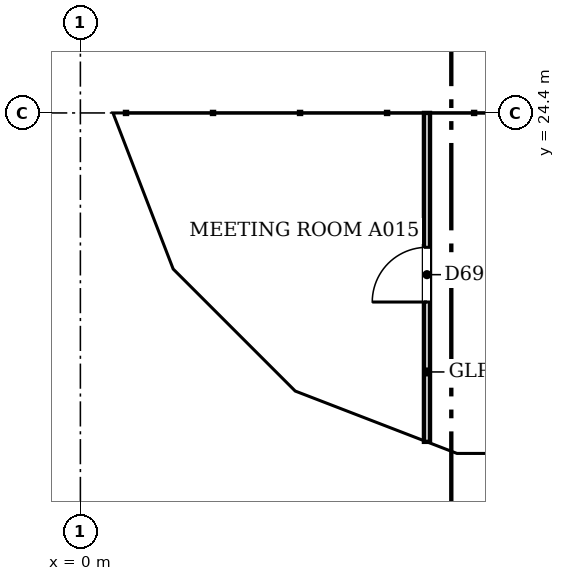
"""IFC4 building model, lengths in metres.
Left out: names, types, materials, properties, quantities, classifications, styles, units other than length and angle.
Written with IfcOpenShell. Run it as: python <this file> out.ifc"""

import sys

from ifc_helpers import new_model, si_unit, direction, frame, frame_2d, origin, place, context, subcontext, project, spatial, polyline, rectangle, outline, extrude, faceted_brep, source, transform, mapped, element, fill, save


model = new_model("IFC4")
c1 = context("Model", 3, precision=1e-05, world=origin(), true_north=direction((0.0, 1.0)))
c2 = subcontext(c1, "Body", "Model", "MODEL_VIEW")
j1 = project(units=[si_unit("LENGTHUNIT", "METRE"), si_unit("PLANEANGLEUNIT", "RADIAN")], contexts=[c1])
p1 = place(None, origin())
s1 = spatial("IfcSite", under=j1, at=p1, CompositionType="ELEMENT")
p2 = place(p1, origin())
s2 = spatial("IfcBuilding", under=s1, at=p2, CompositionType="ELEMENT")
p3 = place(p2, frame((0.0, 0.0, 155.4)))
s3 = spatial("IfcBuildingStorey", under=s2, at=p3, CompositionType="ELEMENT", Elevation=155.4)
m1 = source(origin(), c2, "Body", "Brep", [
    faceted_brep([(6.053, -0.25, 0.0), (3.05, -0.25, 3.8), (0.0, -0.25, 0.0), (0.0, 0.25, 0.0), (3.05, 0.25, 3.8), (6.007, 0.25, 0.059), (6.007, 0.25, 0.0), (6.053, 0.0, 0.0)], [[[0, 1, 2]], [[3, 4, 5, 6]], [[5, 4, 1, 0, 7]], [[4, 3, 2, 1]], [[3, 6, 7, 0, 2]], [[7, 6, 5]]]),
])
p4 = place(p3, frame((0.25, 30.5, 0.0), z_axis=(0.0, 0.0, 1.0), x_axis=(0.0, -1.0, 0.0)))
e1 = element("IfcWall", 1, at=p4, inside=s3, PredefinedType="SOLIDWALL", context=c2, shape_type="MappedRepresentation", body=[
    mapped(m1, transform((0.0, 0.0, 0.0), scale=1.0)),
])
m2 = source(origin(), c2, "Body", "SweptSolid", [
    extrude(outline(polyline([(5.537, 0.25), (3.049, 3.399), (0.521, 0.25), (5.537, 0.25)])), frame((0.0, 0.26, 0.0), z_axis=(0.0, -1.0, 0.0), x_axis=(1.0, 0.0, 0.0)), (0.0, 0.0, 1.0), 0.52),
])
p5 = place(p4, origin())
e2 = element("IfcOpeningElement", 2, at=p5, cuts=e1, PredefinedType="OPENING", context=c2, shape_type="MappedRepresentation", body=[
    mapped(m2, transform((0.0, 0.0, 0.0), scale=1.0)),
])
m3 = source(origin(), c2, "Body", "Brep", [
    faceted_brep([(3.003, -0.25, 3.732), (2.95, -0.25, 3.8), (0.0, -0.25, 0.0), (3.003, -0.25, 0.0), (0.047, 0.25, 0.06), (2.898, 0.25, 3.732), (2.898, 0.25, 0.0), (0.047, 0.25, 0.0), (2.95, 0.0, 3.8), (0.0, 0.0, 0.0)], [[[0, 1, 2, 3]], [[4, 5, 6, 7]], [[8, 1, 0]], [[5, 4, 9, 2, 1, 8]], [[7, 6, 3, 2, 9]], [[7, 9, 4]], [[3, 6, 5, 8, 0]]]),
])
p6 = place(p3, frame((0.25, 24.447, 0.0), z_axis=(0.0, 0.0, 1.0), x_axis=(0.35992665181, -0.932980602862, 0.0)))
e3 = element("IfcWall", 3, at=p6, inside=s3, PredefinedType="SOLIDWALL", context=c2, shape_type="MappedRepresentation", body=[
    mapped(m3, transform((0.0, 0.0, 0.0), scale=1.0)),
])
m4 = source(origin(), c2, "Body", "SweptSolid", [
    extrude(outline(polyline([(2.75, 3.135), (0.511, 0.25), (2.75, 0.25), (2.75, 3.135)])), frame((0.0, 0.26, 0.0), z_axis=(0.0, -1.0, 0.0), x_axis=(1.0, 0.0, 0.0)), (0.0, 0.0, 1.0), 0.52),
])
p7 = place(p6, origin())
e4 = element("IfcOpeningElement", 4, at=p7, cuts=e3, PredefinedType="OPENING", context=c2, shape_type="MappedRepresentation", body=[
    mapped(m4, transform((0.0, 0.0, 0.0), scale=1.0)),
])
m5 = source(origin(), c2, "Body", "Brep", [
    faceted_brep([(2.997, -0.25, 0.0), (0.053, -0.25, 3.8), (0.0, -0.25, 3.732), (0.0, -0.25, 0.0), (0.106, 0.25, 3.732), (2.944, 0.25, 0.068), (2.944, 0.25, 0.0), (0.106, 0.25, 0.0), (0.053, 0.0, 3.8), (2.997, 0.0, 0.0)], [[[0, 1, 2, 3]], [[4, 5, 6, 7]], [[5, 4, 8, 1, 0, 9]], [[2, 1, 8]], [[7, 6, 9, 0, 3]], [[7, 3, 2, 8, 4]], [[9, 6, 5]]]),
])
p8 = place(p3, frame((1.274, 21.731, 0.0), z_axis=(0.0, 0.0, 1.0), x_axis=(0.707147509625, -0.707066050402, 0.0)))
e5 = element("IfcWall", 5, at=p8, inside=s3, PredefinedType="SOLIDWALL", context=c2, shape_type="MappedRepresentation", body=[
    mapped(m5, transform((0.0, 0.0, 0.0), scale=1.0)),
])
m6 = source(origin(), c2, "Body", "SweptSolid", [
    extrude(outline(polyline([(2.487, 0.25), (0.253, 3.134), (0.253, 0.25), (2.487, 0.25)])), frame((0.0, 0.26, 0.0), z_axis=(0.0, -1.0, 0.0), x_axis=(1.0, 0.0, 0.0)), (0.0, 0.0, 1.0), 0.52),
])
p9 = place(p8, origin())
e6 = element("IfcOpeningElement", 6, at=p9, cuts=e5, PredefinedType="OPENING", context=c2, shape_type="MappedRepresentation", body=[
    mapped(m6, transform((0.0, 0.0, 0.0), scale=1.0)),
])
m7 = source(origin(), c2, "Body", "Brep", [
    faceted_brep([(2.997, -0.25, 3.741), (2.95, -0.25, 3.8), (0.0, -0.25, 0.0), (2.997, -0.25, 0.0), (0.053, 0.25, 0.068), (2.904, 0.25, 3.74), (2.904, 0.25, 0.0), (0.053, 0.25, 0.0), (2.95, 0.0, 3.8), (0.0, 0.0, 0.0)], [[[0, 1, 2, 3]], [[4, 5, 6, 7]], [[8, 1, 0]], [[5, 4, 9, 2, 1, 8]], [[7, 6, 3, 2, 9]], [[7, 9, 4]], [[3, 6, 5, 8, 0]]]),
])
p10 = place(p3, frame((3.394, 19.612, 0.0), z_axis=(0.0, 0.0, 1.0), x_axis=(0.932990326376, -0.359901446078, 0.0)))
e7 = element("IfcWall", 7, at=p10, inside=s3, PredefinedType="SOLIDWALL", context=c2, shape_type="MappedRepresentation", body=[
    mapped(m7, transform((0.0, 0.0, 0.0), scale=1.0)),
])
p11 = place(p10, origin())
e8 = element("IfcOpeningElement", 8, at=p11, cuts=e7, PredefinedType="OPENING", context=c2, shape_type="MappedRepresentation", body=[
    mapped(m4, transform((0.0, 0.0, 0.0), scale=1.0)),
])
m8 = source(origin(), c2, "Body", "Brep", [
    faceted_brep([(3.05, -0.25, 0.0), (0.047, -0.25, 3.8), (0.0, -0.25, 3.74), (0.0, -0.25, 0.0), (0.093, 0.25, 3.741), (3.05, 0.25, 0.0), (0.093, 0.25, 0.0), (0.047, 0.0, 3.8)], [[[0, 1, 2, 3]], [[4, 5, 6]], [[5, 4, 7, 1, 0]], [[2, 1, 7]], [[6, 5, 0, 3]], [[6, 3, 2, 7, 4]]]),
])
p12 = place(p3, frame((6.1, 18.55, 0.0), z_axis=(0.0, 0.0, 1.0), x_axis=(1.0, 0.0, 0.0)))
e9 = element("IfcWall", 9, at=p12, inside=s3, PredefinedType="SOLIDWALL", context=c2, shape_type="MappedRepresentation", body=[
    mapped(m8, transform((0.0, 0.0, 0.0), scale=1.0)),
])
m9 = source(origin(), c2, "Body", "SweptSolid", [
    extrude(outline(polyline([(2.534, 0.25), (0.247, 3.144), (0.247, 0.25), (2.534, 0.25)])), frame((0.0, 0.26, 0.0), z_axis=(0.0, -1.0, 0.0), x_axis=(1.0, 0.0, 0.0)), (0.0, 0.0, 1.0), 0.52),
])
p13 = place(p12, origin())
e10 = element("IfcOpeningElement", 10, at=p13, cuts=e9, PredefinedType="OPENING", context=c2, shape_type="MappedRepresentation", body=[
    mapped(m9, transform((0.0, 0.0, 0.0), scale=1.0)),
])
p14 = place(p2, frame((0.0, 0.0, 159.2)))
s4 = spatial("IfcBuildingStorey", under=s2, at=p14, CompositionType="ELEMENT", Elevation=159.2)
m10 = source(origin(), c2, "Body", "Brep", [
    faceted_brep([(3.003, -0.25, 0.0), (3.05, -0.25, 0.06), (3.05, -0.25, 7.54), (3.003, -0.25, 7.6), (0.0, -0.25, 3.8), (0.0, 0.25, 3.8), (2.957, 0.25, 7.541), (2.957, 0.25, 0.059), (3.003, 0.0, 0.0), (3.003, 0.0, 7.6)], [[[0, 1, 2, 3, 4]], [[5, 6, 7]], [[1, 0, 8]], [[9, 3, 2]], [[6, 5, 4, 3, 9]], [[5, 7, 8, 0, 4]], [[1, 8, 7, 6, 9, 2]]]),
])
p15 = place(p14, frame((0.25, 27.45, -3.8), z_axis=(0.0, 0.0, 1.0), x_axis=(0.0, -1.0, 0.0)))
e11 = element("IfcWall", 11, at=p15, inside=s4, PredefinedType="SOLIDWALL", context=c2, shape_type="MappedRepresentation", body=[
    mapped(m10, transform((0.0, 0.0, 0.0), scale=1.0)),
])
m11 = source(origin(), c2, "Body", "SweptSolid", [
    extrude(outline(polyline([(2.803, 6.944), (0.319, 3.8), (2.803, 0.656), (2.803, 6.944)])), frame((0.0, 0.26, 0.0), z_axis=(0.0, -1.0, 0.0), x_axis=(1.0, 0.0, 0.0)), (0.0, 0.0, 1.0), 0.52),
])
p16 = place(p15, origin())
e12 = element("IfcOpeningElement", 12, at=p16, cuts=e11, PredefinedType="OPENING", context=c2, shape_type="MappedRepresentation", body=[
    mapped(m11, transform((0.0, 0.0, 0.0), scale=1.0)),
])
m12 = source(origin(), c2, "Body", "Brep", [
    faceted_brep([(0.047, -0.25, 0.0), (2.997, -0.25, 3.8), (0.047, -0.25, 7.6), (0.0, -0.25, 7.541), (0.0, -0.25, 0.059), (0.093, 0.25, 7.54), (2.944, 0.25, 3.868), (2.944, 0.25, 3.732), (0.093, 0.25, 0.06), (2.997, 0.0, 3.8), (0.047, 0.0, 0.0), (0.047, 0.0, 7.6)], [[[0, 1, 2, 3, 4]], [[5, 6, 7, 8]], [[8, 7, 9, 1, 0, 10]], [[6, 5, 11, 2, 1, 9]], [[3, 2, 11]], [[10, 0, 4]], [[8, 10, 4, 3, 11, 5]], [[9, 7, 6]]]),
])
p17 = place(p14, frame((0.233, 24.49, -3.8), z_axis=(0.0, 0.0, 1.0), x_axis=(0.359901446078, -0.932990326376, 0.0)))
e13 = element("IfcWall", 13, at=p17, inside=s4, PredefinedType="SOLIDWALL", context=c2, shape_type="MappedRepresentation", body=[
    mapped(m12, transform((0.0, 0.0, 0.0), scale=1.0)),
])
m13 = source(origin(), c2, "Body", "SweptSolid", [
    extrude(outline(polyline([(0.247, 0.665), (2.681, 3.8), (0.247, 6.935), (0.247, 0.665)])), frame((0.0, 0.26, 0.0), z_axis=(0.0, -1.0, 0.0), x_axis=(1.0, 0.0, 0.0)), (0.0, 0.0, 1.0), 0.52),
])
p18 = place(p17, origin())
e14 = element("IfcOpeningElement", 14, at=p18, cuts=e13, PredefinedType="OPENING", context=c2, shape_type="MappedRepresentation", body=[
    mapped(m13, transform((0.0, 0.0, 0.0), scale=1.0)),
])
m14 = source(origin(), c2, "Body", "Brep", [
    faceted_brep([(2.944, -0.25, 0.0), (2.997, -0.25, 0.068), (2.997, -0.25, 7.532), (2.944, -0.25, 7.6), (0.0, -0.25, 3.8), (0.053, 0.25, 3.868), (2.891, 0.25, 7.532), (2.891, 0.25, 0.068), (0.053, 0.25, 3.732), (2.944, 0.0, 0.0), (2.944, 0.0, 7.6), (0.0, 0.0, 3.8)], [[[0, 1, 2, 3, 4]], [[5, 6, 7, 8]], [[1, 0, 9]], [[10, 3, 2]], [[6, 5, 11, 4, 3, 10]], [[8, 7, 9, 0, 4, 11]], [[8, 11, 5]], [[1, 9, 7, 6, 10, 2]]]),
])
p19 = place(p14, frame((1.312, 21.694, -3.8), z_axis=(0.0, 0.0, 1.0), x_axis=(0.707066050402, -0.707147509625, 0.0)))
e15 = element("IfcWall", 15, at=p19, inside=s4, PredefinedType="SOLIDWALL", context=c2, shape_type="MappedRepresentation", body=[
    mapped(m14, transform((0.0, 0.0, 0.0), scale=1.0)),
])
m15 = source(origin(), c2, "Body", "SweptSolid", [
    extrude(outline(polyline([(2.744, 6.934), (0.316, 3.8), (2.744, 0.667), (2.744, 6.934)])), frame((0.0, 0.26, 0.0), z_axis=(0.0, -1.0, 0.0), x_axis=(1.0, 0.0, 0.0)), (0.0, 0.0, 1.0), 0.52),
])
p20 = place(p19, origin())
e16 = element("IfcOpeningElement", 16, at=p20, cuts=e15, PredefinedType="OPENING", context=c2, shape_type="MappedRepresentation", body=[
    mapped(m15, transform((0.0, 0.0, 0.0), scale=1.0)),
])
m16 = source(origin(), c2, "Body", "Brep", [
    faceted_brep([(0.053, -0.25, 0.0), (3.003, -0.25, 3.8), (0.053, -0.25, 7.6), (0.0, -0.25, 7.532), (0.0, -0.25, 0.068), (0.106, 0.25, 7.532), (2.957, 0.25, 3.86), (2.957, 0.25, 3.74), (0.106, 0.25, 0.068), (3.003, 0.0, 3.8), (0.053, 0.0, 0.0), (0.053, 0.0, 7.6)], [[[0, 1, 2, 3, 4]], [[5, 6, 7, 8]], [[8, 7, 9, 1, 0, 10]], [[6, 5, 11, 2, 1, 9]], [[3, 2, 11]], [[10, 0, 4]], [[8, 10, 4, 3, 11, 5]], [[9, 7, 6]]]),
])
p21 = place(p14, frame((3.344, 19.631, -3.8), z_axis=(0.0, 0.0, 1.0), x_axis=(0.933007896601, -0.359855894603, 0.0)))
e17 = element("IfcWall", 17, at=p21, inside=s4, PredefinedType="SOLIDWALL", context=c2, shape_type="MappedRepresentation", body=[
    mapped(m16, transform((0.0, 0.0, 0.0), scale=1.0)),
])
m17 = source(origin(), c2, "Body", "SweptSolid", [
    extrude(outline(polyline([(0.253, 0.665), (2.687, 3.8), (0.253, 6.935), (0.253, 0.665)])), frame((0.0, 0.26, 0.0), z_axis=(0.0, -1.0, 0.0), x_axis=(1.0, 0.0, 0.0)), (0.0, 0.0, 1.0), 0.52),
])
p22 = place(p21, origin())
e18 = element("IfcOpeningElement", 18, at=p22, cuts=e17, PredefinedType="OPENING", context=c2, shape_type="MappedRepresentation", body=[
    mapped(m17, transform((0.0, 0.0, 0.0), scale=1.0)),
])
m18 = source(origin(), c2, "Body", "Brep", [
    faceted_brep([(3.003, -0.25, 0.0), (6.053, -0.25, 3.8), (3.003, -0.25, 7.6), (0.0, -0.25, 3.8), (0.047, 0.25, 3.859), (3.003, 0.25, 7.6), (6.053, 0.25, 3.8), (3.003, 0.25, 0.0), (0.047, 0.25, 3.741), (0.0, 0.0, 3.8)], [[[0, 1, 2, 3]], [[4, 5, 6, 7, 8]], [[7, 6, 1, 0]], [[6, 5, 2, 1]], [[5, 4, 9, 3, 2]], [[8, 7, 0, 3, 9]], [[8, 9, 4]]]),
])
p23 = place(p14, frame((6.146, 18.55, -3.8), z_axis=(0.0, 0.0, 1.0), x_axis=(1.0, 0.0, 0.0)))
e19 = element("IfcWall", 19, at=p23, inside=s4, PredefinedType="SOLIDWALL", context=c2, shape_type="MappedRepresentation", body=[
    mapped(m18, transform((0.0, 0.0, 0.0), scale=1.0)),
])
m19 = source(origin(), c2, "Body", "SweptSolid", [
    extrude(outline(polyline([(3.005, 0.401), (5.733, 3.8), (3.005, 7.199), (0.319, 3.8), (3.005, 0.401)])), frame((0.0, 0.26, 0.0), z_axis=(0.0, -1.0, 0.0), x_axis=(1.0, 0.0, 0.0)), (0.0, 0.0, 1.0), 0.52),
])
p24 = place(p23, origin())
e20 = element("IfcOpeningElement", 20, at=p24, cuts=e19, PredefinedType="OPENING", context=c2, shape_type="MappedRepresentation", body=[
    mapped(m19, transform((0.0, 0.0, 0.0), scale=1.0)),
])
p25 = place(p3, frame((5.7, 18.99, 0.0), z_axis=(0.0, 0.0, 1.0), x_axis=(0.0, 1.0, 0.0)))
e21 = element("IfcWall", 21, at=p25, inside=s3, PredefinedType="PARTITIONING", context=c2, shape_type="SweptSolid", body=[
    extrude(rectangle(XDim=5.41, YDim=0.1, at=frame_2d((2.705, 0.0))), origin(), (0.0, 0.0, 1.0), 3.067),
])
m20 = source(origin(), c2, "Body", "SweptSolid", [
    extrude(rectangle(XDim=0.9, YDim=2.1, at=frame_2d((0.45, 1.05))), frame((0.0, 0.06, 0.0), z_axis=(0.0, -1.0, 0.0), x_axis=(1.0, 0.0, 0.0)), (0.0, 0.0, 1.0), 0.12),
])
p26 = place(p25, frame((2.3, 0.0, 0.0)))
e22 = element("IfcOpeningElement", 22, at=p26, cuts=e21, PredefinedType="OPENING", context=c2, shape_type="MappedRepresentation", body=[
    mapped(m20, transform((0.0, 0.0, 0.0), scale=1.0)),
])
m21 = source(origin(), c2, "Body", "SweptSolid", [
    extrude(rectangle(XDim=0.9, YDim=2.1, at=frame_2d((0.45, 1.05))), frame((0.0, 0.025, 0.0), z_axis=(0.0, -1.0, 0.0), x_axis=(1.0, 0.0, 0.0)), (0.0, 0.0, 1.0), 0.05),
])
p27 = place(p26, origin())
e23 = element("IfcDoor", 23, at=p27, inside=s3, OperationType="SINGLE_SWING_LEFT", PredefinedType="DOOR", context=c2, shape_type="MappedRepresentation", body=[
    mapped(m21, transform((0.0, 0.0, 0.0), scale=1.0)),
])
fill(e22, e23)
save(model, sys.argv[1])
